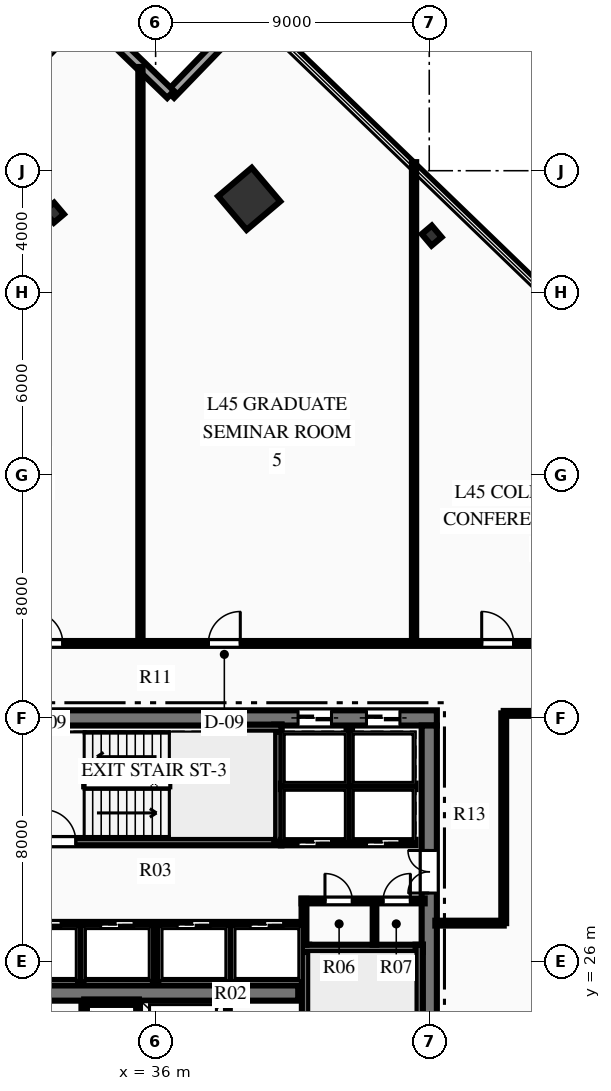
"""IFC4 building model, lengths in metres.
Left out: names, types, materials, properties, quantities, classifications, styles, units other than length and angle.
Written with IfcOpenShell. Run it as: python <this file> out.ifc"""

import sys

from ifc_helpers import new_model, si_unit, direction, frame, frame_2d, origin, origin_2d, place, context, subcontext, project, spatial, rectangle, hollow_rectangle, i_section, extrude, element, fill, save


model = new_model("IFC4")
c1 = context("Model", 3, precision=1e-05, world=origin(), true_north=direction((0.0, 1.0)))
c2 = subcontext(c1, "Body", "Model", "MODEL_VIEW")
j1 = project(units=[si_unit("LENGTHUNIT", "METRE"), si_unit("PLANEANGLEUNIT", "RADIAN")], contexts=[c1])
p1 = place(None, origin())
s1 = spatial("IfcSite", under=j1, at=p1, CompositionType="ELEMENT")
p2 = place(p1, origin())
s2 = spatial("IfcBuilding", under=s1, at=p2, CompositionType="ELEMENT")
p3 = place(p2, frame((0.0, 0.0, 181.95)))
s3 = spatial("IfcBuildingStorey", under=s2, at=p3, CompositionType="ELEMENT", Elevation=181.95)
p4 = place(p3, frame((26.75, 34.0, 0.0), z_axis=(0.0, 0.0, 1.0), x_axis=(1.0, 0.0, 0.0)))
e1 = element("IfcWall", 1, at=p4, inside=s3, PredefinedType="SHEAR", context=c2, shape_type="SweptSolid", body=[
    extrude(rectangle(XDim=18.5, YDim=0.5, at=frame_2d((9.25, 0.0))), origin(), (0.0, 0.0, 1.0), 3.75),
])
p5 = place(p4, frame((13.935, 0.0, 0.0)))
e2 = element("IfcOpeningElement", 2, at=p5, cuts=e1, PredefinedType="OPENING", context=c2, shape_type="SweptSolid", body=[
    extrude(rectangle(XDim=1.1, YDim=2.15, at=frame_2d((0.55, 1.075))), frame((0.0, 0.26, 0.0), z_axis=(0.0, -1.0, 0.0), x_axis=(1.0, 0.0, 0.0)), (0.0, 0.0, 1.0), 0.52),
])
p6 = place(p4, frame((16.185, 0.0, 0.0)))
e3 = element("IfcOpeningElement", 3, at=p6, cuts=e1, PredefinedType="OPENING", context=c2, shape_type="SweptSolid", body=[
    extrude(rectangle(XDim=1.1, YDim=2.15, at=frame_2d((0.55, 1.075))), frame((0.0, 0.26, 0.0), z_axis=(0.0, -1.0, 0.0), x_axis=(1.0, 0.0, 0.0)), (0.0, 0.0, 1.0), 0.52),
])
p7 = place(p3, frame((45.0, 18.25, 0.0), z_axis=(0.0, 0.0, 1.0), x_axis=(0.0, 1.0, 0.0)))
e4 = element("IfcWall", 4, at=p7, inside=s3, PredefinedType="SHEAR", context=c2, shape_type="SweptSolid", body=[
    extrude(rectangle(XDim=15.5, YDim=0.5, at=frame_2d((7.75, 0.0))), origin(), (0.0, 0.0, 1.0), 3.75),
])
p8 = place(p7, frame((9.99, 0.0, 0.0)))
e5 = element("IfcOpeningElement", 5, at=p8, cuts=e4, PredefinedType="OPENING", context=c2, shape_type="SweptSolid", body=[
    extrude(rectangle(XDim=1.4, YDim=2.2, at=frame_2d((0.7, 1.1))), frame((0.0, 0.26, 0.0), z_axis=(0.0, -1.0, 0.0), x_axis=(1.0, 0.0, 0.0)), (0.0, 0.0, 1.0), 0.52),
])
p9 = place(p3, frame((31.31, 24.95, 0.0), z_axis=(0.0, 0.0, 1.0), x_axis=(1.0, 0.0, 0.0)))
e6 = element("IfcWall", 6, at=p9, inside=s3, PredefinedType="SHEAR", context=c2, shape_type="SweptSolid", body=[
    extrude(rectangle(XDim=9.38, YDim=0.5, at=frame_2d((4.69, 0.0))), origin(), (0.0, 0.0, 1.0), 3.75),
])
p10 = place(p3, frame((40.93, 18.28, 0.0), z_axis=(0.0, 0.0, 1.0), x_axis=(0.0, 1.0, 0.0)))
e7 = element("IfcWall", 7, at=p10, inside=s3, PredefinedType="SHEAR", context=c2, shape_type="SweptSolid", body=[
    extrude(rectangle(XDim=8.26, YDim=0.24, at=frame_2d((4.13, 0.0))), origin(), (0.0, 0.0, 1.0), 3.75),
])
p11 = place(p10, frame((0.365, 0.0, 0.0)))
e8 = element("IfcOpeningElement", 8, at=p11, cuts=e7, PredefinedType="OPENING", context=c2, shape_type="SweptSolid", body=[
    extrude(rectangle(XDim=1.05, YDim=2.15, at=frame_2d((0.525, 1.075))), frame((0.0, 0.13, 0.0), z_axis=(0.0, -1.0, 0.0), x_axis=(1.0, 0.0, 0.0)), (0.0, 0.0, 1.0), 0.26),
])
p12 = place(p3, frame((40.81, 26.42, 0.0), z_axis=(0.0, 0.0, 1.0), x_axis=(1.0, 0.0, 0.0)))
e9 = element("IfcWall", 9, at=p12, inside=s3, PredefinedType="SHEAR", context=c2, shape_type="SweptSolid", body=[
    extrude(rectangle(XDim=3.98, YDim=0.24, at=frame_2d((1.99, 0.0))), origin(), (0.0, 0.0, 1.0), 3.75),
])
p13 = place(p3, frame((44.67, 18.28, 0.0), z_axis=(0.0, 0.0, 1.0), x_axis=(0.0, 1.0, 0.0)))
e10 = element("IfcWall", 10, at=p13, inside=s3, PredefinedType="SHEAR", context=c2, shape_type="SweptSolid", body=[
    extrude(rectangle(XDim=8.26, YDim=0.24, at=frame_2d((4.13, 0.0))), origin(), (0.0, 0.0, 1.0), 3.75),
])
p14 = place(p3, frame((31.76, 29.93, 0.0), z_axis=(0.0, 0.0, 1.0), x_axis=(1.0, 0.0, 0.0)))
e11 = element("IfcWall", 11, at=p14, inside=s3, PredefinedType="SHEAR", context=c2, shape_type="SweptSolid", body=[
    extrude(rectangle(XDim=8.38, YDim=0.24, at=frame_2d((4.19, 0.0))), origin(), (0.0, 0.0, 1.0), 3.75),
])
p15 = place(p14, frame((0.565, 0.0, 0.0)))
e12 = element("IfcOpeningElement", 12, at=p15, cuts=e11, PredefinedType="OPENING", context=c2, shape_type="SweptSolid", body=[
    extrude(rectangle(XDim=1.05, YDim=2.15, at=frame_2d((0.525, 1.075))), frame((0.0, 0.13, 0.0), z_axis=(0.0, -1.0, 0.0), x_axis=(1.0, 0.0, 0.0)), (0.0, 0.0, 1.0), 0.26),
])
p16 = place(p3, frame((40.02, 29.93, 0.0), z_axis=(0.0, 0.0, 1.0), x_axis=(0.0, 1.0, 0.0)))
e13 = element("IfcWall", 13, at=p16, inside=s3, PredefinedType="SHEAR", context=c2, shape_type="SweptSolid", body=[
    extrude(rectangle(XDim=3.85, YDim=0.24, at=frame_2d((1.925, 0.0))), origin(), (0.0, 0.0, 1.0), 3.75),
])
p17 = place(p3, frame((37.85, 33.66, 0.0), z_axis=(0.0, 0.0, 1.0), x_axis=(1.0, 0.0, 0.0)))
e14 = element("IfcWall", 14, at=p17, inside=s3, PredefinedType="SHEAR", context=c2, shape_type="SweptSolid", body=[
    extrude(rectangle(XDim=2.29, YDim=0.24, at=frame_2d((1.145, 0.0))), origin(), (0.0, 0.0, 1.0), 3.75),
])
p18 = place(p3, frame((39.077, 51.075, 0.0), z_axis=(0.0, 0.0, 1.0), x_axis=(0.763232469783, 0.646123979643, 0.0)))
e15 = element("IfcColumn", 15, at=p18, inside=s3, PredefinedType="COLUMN", context=c2, shape_type="SweptSolid", body=[
    extrude(hollow_rectangle(XDim=1.45, YDim=1.45, WallThickness=0.07, at=origin_2d()), origin(), (0.0, 0.0, 1.0), 3.75),
])
for number, where, z_axis, x_axis in (
    (16, (45.08, 49.865, 0.0), (0.0, 0.0, 1.0), (0.763, 0.646, 0.0)),
    (17, (32.657, 50.619, 0.0), (0.0, 0.0, 1.0), (0.763, 0.646, 0.0)),
):
    element("IfcColumn", number, at=place(p3, frame(where, z_axis=z_axis, x_axis=x_axis)), inside=s3, PredefinedType="COLUMN", context=c2, shape_type="SweptSolid", body=[
        extrude(i_section(OverallWidth=0.432, OverallDepth=0.498, WebThickness=0.056, FlangeThickness=0.089, at=origin_2d()), origin(), (0.0, 0.0, 1.0), 3.75),
    ])
p19 = place(p3, frame((36.492, 54.509, 0.0), z_axis=(0.0, 0.0, 1.0), x_axis=(0.694639171191, 0.719358340361, 0.0)))
e18 = element("IfcWall", 18, at=p19, inside=s3, PredefinedType="STANDARD", context=c2, shape_type="SweptSolid", body=[
    extrude(rectangle(XDim=4.0, YDim=0.32, at=frame_2d((2.0, 0.0))), origin(), (0.0, 0.0, 1.0), 3.46),
])
p20 = place(p3, frame((33.615, 57.288, 0.0), z_axis=(0.0, 0.0, 1.0), x_axis=(0.719327842116, -0.694670753348, 0.0)))
e19 = element("IfcWall", 19, at=p20, inside=s3, PredefinedType="STANDARD", context=c2, shape_type="SweptSolid", body=[
    extrude(rectangle(XDim=4.0, YDim=0.32, at=frame_2d((2.0, 0.0))), origin(), (0.0, 0.0, 1.0), 3.46),
])
for number, where, z_axis, x_axis in (
    (20, (33.65, 22.05, 0.0), (0.0, 0.0, 1.0), (0.0, 1.0, 0.0)),
    (21, (35.45, 22.05, 0.0), (0.0, 0.0, 1.0), (0.0, 1.0, 0.0)),
):
    element("IfcWall", number, at=place(p3, frame(where, z_axis=z_axis, x_axis=x_axis)), inside=s3, PredefinedType="PARTITIONING", context=c2, shape_type="SweptSolid", body=[
        extrude(rectangle(XDim=2.6, YDim=0.18, at=frame_2d((1.3, 0.0))), origin(), (0.0, 0.0, 1.0), 3.46),
    ])
p21 = place(p3, frame((33.65, 24.65, 0.0), z_axis=(0.0, 0.0, 1.0), x_axis=(1.0, 0.0, 0.0)))
e22 = element("IfcWall", 22, at=p21, inside=s3, PredefinedType="PARTITIONING", context=c2, shape_type="SweptSolid", body=[
    extrude(rectangle(XDim=1.8, YDim=0.18, at=frame_2d((0.9, 0.0))), origin(), (0.0, 0.0, 1.0), 3.46),
])
p22 = place(p3, frame((38.35, 22.05, 0.0), z_axis=(0.0, 0.0, 1.0), x_axis=(0.0, 1.0, 0.0)))
e23 = element("IfcWall", 23, at=p22, inside=s3, PredefinedType="PARTITIONING", context=c2, shape_type="SweptSolid", body=[
    extrude(rectangle(XDim=2.6, YDim=0.18, at=frame_2d((1.3, 0.0))), origin(), (0.0, 0.0, 1.0), 3.46),
])
p23 = place(p3, frame((40.8, 27.98, 0.0), z_axis=(0.0, 0.0, 1.0), x_axis=(1.0, 0.0, 0.0)))
e24 = element("IfcWall", 24, at=p23, inside=s3, PredefinedType="PARTITIONING", context=c2, shape_type="SweptSolid", body=[
    extrude(rectangle(XDim=4.05, YDim=0.16, at=frame_2d((2.025, 0.0))), origin(), (0.0, 0.0, 1.0), 3.46),
])
p24 = place(p23, frame((0.77, 0.0, 0.0)))
e25 = element("IfcOpeningElement", 25, at=p24, cuts=e24, PredefinedType="OPENING", context=c2, shape_type="SweptSolid", body=[
    extrude(rectangle(XDim=0.9, YDim=2.15, at=frame_2d((0.45, 1.075))), frame((0.0, 0.09, 0.0), z_axis=(0.0, -1.0, 0.0), x_axis=(1.0, 0.0, 0.0)), (0.0, 0.0, 1.0), 0.18),
])
p25 = place(p23, frame((2.68, 0.0, 0.0)))
e26 = element("IfcOpeningElement", 26, at=p25, cuts=e24, PredefinedType="OPENING", context=c2, shape_type="SweptSolid", body=[
    extrude(rectangle(XDim=0.9, YDim=2.15, at=frame_2d((0.45, 1.075))), frame((0.0, 0.09, 0.0), z_axis=(0.0, -1.0, 0.0), x_axis=(1.0, 0.0, 0.0)), (0.0, 0.0, 1.0), 0.18),
])
p26 = place(p3, frame((40.88, 26.54, 0.0), z_axis=(0.0, 0.0, 1.0), x_axis=(0.0, 1.0, 0.0)))
e27 = element("IfcWall", 27, at=p26, inside=s3, PredefinedType="PARTITIONING", context=c2, shape_type="SweptSolid", body=[
    extrude(rectangle(XDim=1.51, YDim=0.16, at=frame_2d((0.755, 0.0))), origin(), (0.0, 0.0, 1.0), 3.46),
])
p27 = place(p3, frame((43.2, 26.54, 0.0), z_axis=(0.0, 0.0, 1.0), x_axis=(0.0, 1.0, 0.0)))
e28 = element("IfcWall", 28, at=p27, inside=s3, PredefinedType="PARTITIONING", context=c2, shape_type="SweptSolid", body=[
    extrude(rectangle(XDim=1.44, YDim=0.12, at=frame_2d((0.72, 0.0))), origin(), (0.0, 0.0, 1.0), 3.46),
])
p28 = place(p3, frame((40.12, 29.9, 0.0), z_axis=(0.0, 0.0, 1.0), x_axis=(1.0, 0.0, 0.0)))
e29 = element("IfcWall", 29, at=p28, inside=s3, PredefinedType="PARTITIONING", context=c2, shape_type="SweptSolid", body=[
    extrude(rectangle(XDim=4.43, YDim=0.18, at=frame_2d((2.215, 0.0))), origin(), (0.0, 0.0, 1.0), 3.46),
])
p29 = place(p28, frame((0.565, 0.0, 0.0)))
e30 = element("IfcOpeningElement", 30, at=p29, cuts=e29, PredefinedType="OPENING", context=c2, shape_type="SweptSolid", body=[
    extrude(rectangle(XDim=1.1, YDim=2.15, at=frame_2d((0.55, 1.075))), frame((0.0, 0.1, 0.0), z_axis=(0.0, -1.0, 0.0), x_axis=(1.0, 0.0, 0.0)), (0.0, 0.0, 1.0), 0.2),
])
p30 = place(p28, frame((2.815, 0.0, 0.0)))
e31 = element("IfcOpeningElement", 31, at=p30, cuts=e29, PredefinedType="OPENING", context=c2, shape_type="SweptSolid", body=[
    extrude(rectangle(XDim=1.1, YDim=2.15, at=frame_2d((0.55, 1.075))), frame((0.0, 0.1, 0.0), z_axis=(0.0, -1.0, 0.0), x_axis=(1.0, 0.0, 0.0)), (0.0, 0.0, 1.0), 0.2),
])
p31 = place(p3, frame((40.12, 31.75, 0.0), z_axis=(0.0, 0.0, 1.0), x_axis=(1.0, 0.0, 0.0)))
e32 = element("IfcWall", 32, at=p31, inside=s3, PredefinedType="PARTITIONING", context=c2, shape_type="SweptSolid", body=[
    extrude(rectangle(XDim=4.43, YDim=0.18, at=frame_2d((2.215, 0.0))), origin(), (0.0, 0.0, 1.0), 3.46),
])
p32 = place(p3, frame((42.37, 29.9, 0.0), z_axis=(0.0, 0.0, 1.0), x_axis=(0.0, 1.0, 0.0)))
e33 = element("IfcWall", 33, at=p32, inside=s3, PredefinedType="PARTITIONING", context=c2, shape_type="SweptSolid", body=[
    extrude(rectangle(XDim=3.75, YDim=0.18, at=frame_2d((1.875, 0.0))), origin(), (0.0, 0.0, 1.0), 3.46),
])
p33 = place(p3, frame((31.2, 27.2, 0.0), z_axis=(0.0, 0.0, 1.0), x_axis=(1.0, 0.0, 0.0)))
e34 = element("IfcWall", 34, at=p33, inside=s3, PredefinedType="PARTITIONING", context=c2, shape_type="SweptSolid", body=[
    extrude(rectangle(XDim=9.6, YDim=0.18, at=frame_2d((4.8, 0.0))), origin(), (0.0, 0.0, 1.0), 3.46),
])
p34 = place(p33, frame((0.59, 0.0, 0.0)))
e35 = element("IfcOpeningElement", 35, at=p34, cuts=e34, PredefinedType="OPENING", context=c2, shape_type="SweptSolid", body=[
    extrude(rectangle(XDim=1.1, YDim=2.15, at=frame_2d((0.55, 1.075))), frame((0.0, 0.1, 0.0), z_axis=(0.0, -1.0, 0.0), x_axis=(1.0, 0.0, 0.0)), (0.0, 0.0, 1.0), 0.2),
])
p35 = place(p33, frame((2.99, 0.0, 0.0)))
e36 = element("IfcOpeningElement", 36, at=p35, cuts=e34, PredefinedType="OPENING", context=c2, shape_type="SweptSolid", body=[
    extrude(rectangle(XDim=1.1, YDim=2.15, at=frame_2d((0.55, 1.075))), frame((0.0, 0.1, 0.0), z_axis=(0.0, -1.0, 0.0), x_axis=(1.0, 0.0, 0.0)), (0.0, 0.0, 1.0), 0.2),
])
p36 = place(p33, frame((5.51, 0.0, 0.0)))
e37 = element("IfcOpeningElement", 37, at=p36, cuts=e34, PredefinedType="OPENING", context=c2, shape_type="SweptSolid", body=[
    extrude(rectangle(XDim=1.1, YDim=2.15, at=frame_2d((0.55, 1.075))), frame((0.0, 0.1, 0.0), z_axis=(0.0, -1.0, 0.0), x_axis=(1.0, 0.0, 0.0)), (0.0, 0.0, 1.0), 0.2),
])
p37 = place(p33, frame((7.91, 0.0, 0.0)))
e38 = element("IfcOpeningElement", 38, at=p37, cuts=e34, PredefinedType="OPENING", context=c2, shape_type="SweptSolid", body=[
    extrude(rectangle(XDim=1.1, YDim=2.15, at=frame_2d((0.55, 1.075))), frame((0.0, 0.1, 0.0), z_axis=(0.0, -1.0, 0.0), x_axis=(1.0, 0.0, 0.0)), (0.0, 0.0, 1.0), 0.2),
])
for number, where, z_axis, x_axis in (
    (39, (33.54, 25.3, 0.0), (0.0, 0.0, 1.0), (0.0, 1.0, 0.0)),
    (40, (36.0, 25.3, 0.0), (0.0, 0.0, 1.0), (0.0, 1.0, 0.0)),
    (41, (38.46, 25.3, 0.0), (0.0, 0.0, 1.0), (0.0, 1.0, 0.0)),
):
    element("IfcWall", number, at=place(p3, frame(where, z_axis=z_axis, x_axis=x_axis)), inside=s3, PredefinedType="PARTITIONING", context=c2, shape_type="SweptSolid", body=[
        extrude(rectangle(XDim=1.9, YDim=0.18, at=frame_2d((0.95, 0.0))), origin(), (0.0, 0.0, 1.0), 3.46),
    ])
p38 = place(p3, frame((18.2, 36.45, 0.0), z_axis=(0.0, 0.0, 1.0), x_axis=(1.0, 0.0, 0.0)))
e42 = element("IfcWall", 42, at=p38, inside=s3, PredefinedType="PARTITIONING", context=c2, shape_type="SweptSolid", body=[
    extrude(rectangle(XDim=35.6, YDim=0.16, at=frame_2d((17.8, 0.0))), origin(), (0.0, 0.0, 1.0), 3.46),
])
p39 = place(p38, frame((1.917, 0.0, 0.0)))
e43 = element("IfcOpeningElement", 43, at=p39, cuts=e42, PredefinedType="OPENING", context=c2, shape_type="SweptSolid", body=[
    extrude(rectangle(XDim=1.05, YDim=2.15, at=frame_2d((0.525, 1.075))), frame((0.0, 0.09, 0.0), z_axis=(0.0, -1.0, 0.0), x_axis=(1.0, 0.0, 0.0)), (0.0, 0.0, 1.0), 0.18),
])
p40 = place(p38, frame((13.695, 0.0, 0.0)))
e44 = element("IfcOpeningElement", 44, at=p40, cuts=e42, PredefinedType="OPENING", context=c2, shape_type="SweptSolid", body=[
    extrude(rectangle(XDim=1.05, YDim=2.15, at=frame_2d((0.525, 1.075))), frame((0.0, 0.09, 0.0), z_axis=(0.0, -1.0, 0.0), x_axis=(1.0, 0.0, 0.0)), (0.0, 0.0, 1.0), 0.18),
])
p41 = place(p38, frame((19.535, 0.0, 0.0)))
e45 = element("IfcOpeningElement", 45, at=p41, cuts=e42, PredefinedType="OPENING", context=c2, shape_type="SweptSolid", body=[
    extrude(rectangle(XDim=1.05, YDim=2.15, at=frame_2d((0.525, 1.075))), frame((0.0, 0.09, 0.0), z_axis=(0.0, -1.0, 0.0), x_axis=(1.0, 0.0, 0.0)), (0.0, 0.0, 1.0), 0.18),
])
p42 = place(p38, frame((28.525, 0.0, 0.0)))
e46 = element("IfcOpeningElement", 46, at=p42, cuts=e42, PredefinedType="OPENING", context=c2, shape_type="SweptSolid", body=[
    extrude(rectangle(XDim=1.05, YDim=2.15, at=frame_2d((0.525, 1.075))), frame((0.0, 0.09, 0.0), z_axis=(0.0, -1.0, 0.0), x_axis=(1.0, 0.0, 0.0)), (0.0, 0.0, 1.0), 0.18),
])
p43 = place(p3, frame((47.45, 34.15, 0.0), z_axis=(0.0, 0.0, 1.0), x_axis=(1.0, 0.0, 0.0)))
e47 = element("IfcWall", 47, at=p43, inside=s3, PredefinedType="PARTITIONING", context=c2, shape_type="SweptSolid", body=[
    extrude(rectangle(XDim=6.35, YDim=0.16, at=frame_2d((3.175, 0.0))), origin(), (0.0, 0.0, 1.0), 3.46),
])
p44 = place(p3, frame((47.45, 27.25, 0.0), z_axis=(0.0, 0.0, 1.0), x_axis=(0.0, 1.0, 0.0)))
e48 = element("IfcWall", 48, at=p44, inside=s3, PredefinedType="PARTITIONING", context=c2, shape_type="SweptSolid", body=[
    extrude(rectangle(XDim=6.9, YDim=0.16, at=frame_2d((3.45, 0.0))), origin(), (0.0, 0.0, 1.0), 3.46),
])
p45 = place(p3, frame((45.2, 27.25, 0.0), z_axis=(0.0, 0.0, 1.0), x_axis=(1.0, 0.0, 0.0)))
e49 = element("IfcWall", 49, at=p45, inside=s3, PredefinedType="PARTITIONING", context=c2, shape_type="SweptSolid", body=[
    extrude(rectangle(XDim=2.25, YDim=0.16, at=frame_2d((1.125, 0.0))), origin(), (0.0, 0.0, 1.0), 3.46),
])
p46 = place(p3, frame((35.5, 36.45, 0.0), z_axis=(0.0, 0.0, 1.0), x_axis=(0.0, 1.0, 0.0)))
e50 = element("IfcWall", 50, at=p46, inside=s3, PredefinedType="PARTITIONING", context=c2, shape_type="SweptSolid", body=[
    extrude(rectangle(XDim=18.962, YDim=0.14, at=frame_2d((9.481, 0.0))), origin(), (0.0, 0.0, 1.0), 3.46),
])
p47 = place(p3, frame((44.5, 36.45, 0.0), z_axis=(0.0, 0.0, 1.0), x_axis=(0.0, 1.0, 0.0)))
e51 = element("IfcWall", 51, at=p47, inside=s3, PredefinedType="PARTITIONING", context=c2, shape_type="SweptSolid", body=[
    extrude(rectangle(XDim=15.832, YDim=0.14, at=frame_2d((7.916, 0.0))), origin(), (0.0, 0.0, 1.0), 3.46),
])
p48 = place(p24, origin())
e52 = element("IfcDoor", 52, at=p48, inside=s3, OperationType="SINGLE_SWING_LEFT", PredefinedType="DOOR", context=c2, shape_type="SweptSolid", body=[
    extrude(rectangle(XDim=0.9, YDim=2.15, at=frame_2d((0.45, 1.075))), frame((0.0, 0.025, 0.0), z_axis=(0.0, -1.0, 0.0), x_axis=(1.0, 0.0, 0.0)), (0.0, 0.0, 1.0), 0.05),
])
fill(e25, e52)
p49 = place(p25, origin())
e53 = element("IfcDoor", 53, at=p49, inside=s3, OperationType="SINGLE_SWING_RIGHT", PredefinedType="DOOR", context=c2, shape_type="SweptSolid", body=[
    extrude(rectangle(XDim=0.9, YDim=2.15, at=frame_2d((0.45, 1.075))), frame((0.0, 0.025, 0.0), z_axis=(0.0, -1.0, 0.0), x_axis=(1.0, 0.0, 0.0)), (0.0, 0.0, 1.0), 0.05),
])
fill(e26, e53)
p50 = place(p15, origin())
e54 = element("IfcDoor", 54, at=p50, inside=s3, OperationType="SINGLE_SWING_LEFT", PredefinedType="DOOR", context=c2, shape_type="SweptSolid", body=[
    extrude(rectangle(XDim=1.05, YDim=2.15, at=frame_2d((0.525, 1.075))), frame((0.0, 0.025, 0.0), z_axis=(0.0, -1.0, 0.0), x_axis=(1.0, 0.0, 0.0)), (0.0, 0.0, 1.0), 0.05),
])
fill(e12, e54)
p51 = place(p8, origin())
e55 = element("IfcDoor", 55, at=p51, inside=s3, OperationType="DOUBLE_DOOR_SINGLE_SWING", PredefinedType="DOOR", context=c2, shape_type="SweptSolid", body=[
    extrude(rectangle(XDim=1.4, YDim=2.2, at=frame_2d((0.7, 1.1))), frame((0.0, 0.025, 0.0), z_axis=(0.0, -1.0, 0.0), x_axis=(1.0, 0.0, 0.0)), (0.0, 0.0, 1.0), 0.05),
])
fill(e5, e55)
p52 = place(p40, origin())
e56 = element("IfcDoor", 56, at=p52, inside=s3, OperationType="SINGLE_SWING_LEFT", PredefinedType="DOOR", context=c2, shape_type="SweptSolid", body=[
    extrude(rectangle(XDim=1.05, YDim=2.15, at=frame_2d((0.525, 1.075))), frame((0.0, 0.025, 0.0), z_axis=(0.0, -1.0, 0.0), x_axis=(1.0, 0.0, 0.0)), (0.0, 0.0, 1.0), 0.05),
])
fill(e44, e56)
p53 = place(p41, origin())
e57 = element("IfcDoor", 57, at=p53, inside=s3, OperationType="SINGLE_SWING_RIGHT", PredefinedType="DOOR", context=c2, shape_type="SweptSolid", body=[
    extrude(rectangle(XDim=1.05, YDim=2.15, at=frame_2d((0.525, 1.075))), frame((0.0, 0.025, 0.0), z_axis=(0.0, -1.0, 0.0), x_axis=(1.0, 0.0, 0.0)), (0.0, 0.0, 1.0), 0.05),
])
fill(e45, e57)
p54 = place(p42, origin())
e58 = element("IfcDoor", 58, at=p54, inside=s3, OperationType="SINGLE_SWING_LEFT", PredefinedType="DOOR", context=c2, shape_type="SweptSolid", body=[
    extrude(rectangle(XDim=1.05, YDim=2.15, at=frame_2d((0.525, 1.075))), frame((0.0, 0.025, 0.0), z_axis=(0.0, -1.0, 0.0), x_axis=(1.0, 0.0, 0.0)), (0.0, 0.0, 1.0), 0.05),
])
fill(e46, e58)
p55 = place(p29, origin())
e59 = element("IfcDoor", 59, at=p55, inside=s3, OperationType="SLIDING_TO_LEFT", PredefinedType="DOOR", context=c2, shape_type="SweptSolid", body=[
    extrude(rectangle(XDim=1.1, YDim=2.15, at=frame_2d((0.55, 1.075))), frame((0.0, 0.025, 0.0), z_axis=(0.0, -1.0, 0.0), x_axis=(1.0, 0.0, 0.0)), (0.0, 0.0, 1.0), 0.05),
])
fill(e30, e59)
p56 = place(p30, origin())
e60 = element("IfcDoor", 60, at=p56, inside=s3, OperationType="SLIDING_TO_LEFT", PredefinedType="DOOR", context=c2, shape_type="SweptSolid", body=[
    extrude(rectangle(XDim=1.1, YDim=2.15, at=frame_2d((0.55, 1.075))), frame((0.0, 0.025, 0.0), z_axis=(0.0, -1.0, 0.0), x_axis=(1.0, 0.0, 0.0)), (0.0, 0.0, 1.0), 0.05),
])
fill(e31, e60)
p57 = place(p5, origin())
e61 = element("IfcDoor", 61, at=p57, inside=s3, OperationType="SLIDING_TO_LEFT", PredefinedType="DOOR", context=c2, shape_type="SweptSolid", body=[
    extrude(rectangle(XDim=1.1, YDim=2.15, at=frame_2d((0.55, 1.075))), frame((0.0, 0.025, 0.0), z_axis=(0.0, -1.0, 0.0), x_axis=(1.0, 0.0, 0.0)), (0.0, 0.0, 1.0), 0.05),
])
fill(e2, e61)
p58 = place(p6, origin())
e62 = element("IfcDoor", 62, at=p58, inside=s3, OperationType="SLIDING_TO_LEFT", PredefinedType="DOOR", context=c2, shape_type="SweptSolid", body=[
    extrude(rectangle(XDim=1.1, YDim=2.15, at=frame_2d((0.55, 1.075))), frame((0.0, 0.025, 0.0), z_axis=(0.0, -1.0, 0.0), x_axis=(1.0, 0.0, 0.0)), (0.0, 0.0, 1.0), 0.05),
])
fill(e3, e62)
p59 = place(p34, origin())
e63 = element("IfcDoor", 63, at=p59, inside=s3, OperationType="SLIDING_TO_LEFT", PredefinedType="DOOR", context=c2, shape_type="SweptSolid", body=[
    extrude(rectangle(XDim=1.1, YDim=2.15, at=frame_2d((0.55, 1.075))), frame((0.0, 0.025, 0.0), z_axis=(0.0, -1.0, 0.0), x_axis=(1.0, 0.0, 0.0)), (0.0, 0.0, 1.0), 0.05),
])
fill(e35, e63)
p60 = place(p35, origin())
e64 = element("IfcDoor", 64, at=p60, inside=s3, OperationType="SLIDING_TO_LEFT", PredefinedType="DOOR", context=c2, shape_type="SweptSolid", body=[
    extrude(rectangle(XDim=1.1, YDim=2.15, at=frame_2d((0.55, 1.075))), frame((0.0, 0.025, 0.0), z_axis=(0.0, -1.0, 0.0), x_axis=(1.0, 0.0, 0.0)), (0.0, 0.0, 1.0), 0.05),
])
fill(e36, e64)
p61 = place(p36, origin())
e65 = element("IfcDoor", 65, at=p61, inside=s3, OperationType="SLIDING_TO_LEFT", PredefinedType="DOOR", context=c2, shape_type="SweptSolid", body=[
    extrude(rectangle(XDim=1.1, YDim=2.15, at=frame_2d((0.55, 1.075))), frame((0.0, 0.025, 0.0), z_axis=(0.0, -1.0, 0.0), x_axis=(1.0, 0.0, 0.0)), (0.0, 0.0, 1.0), 0.05),
])
fill(e37, e65)
p62 = place(p37, origin())
e66 = element("IfcDoor", 66, at=p62, inside=s3, OperationType="SLIDING_TO_LEFT", PredefinedType="DOOR", context=c2, shape_type="SweptSolid", body=[
    extrude(rectangle(XDim=1.1, YDim=2.15, at=frame_2d((0.55, 1.075))), frame((0.0, 0.025, 0.0), z_axis=(0.0, -1.0, 0.0), x_axis=(1.0, 0.0, 0.0)), (0.0, 0.0, 1.0), 0.05),
])
fill(e38, e66)
save(model, sys.argv[1])
